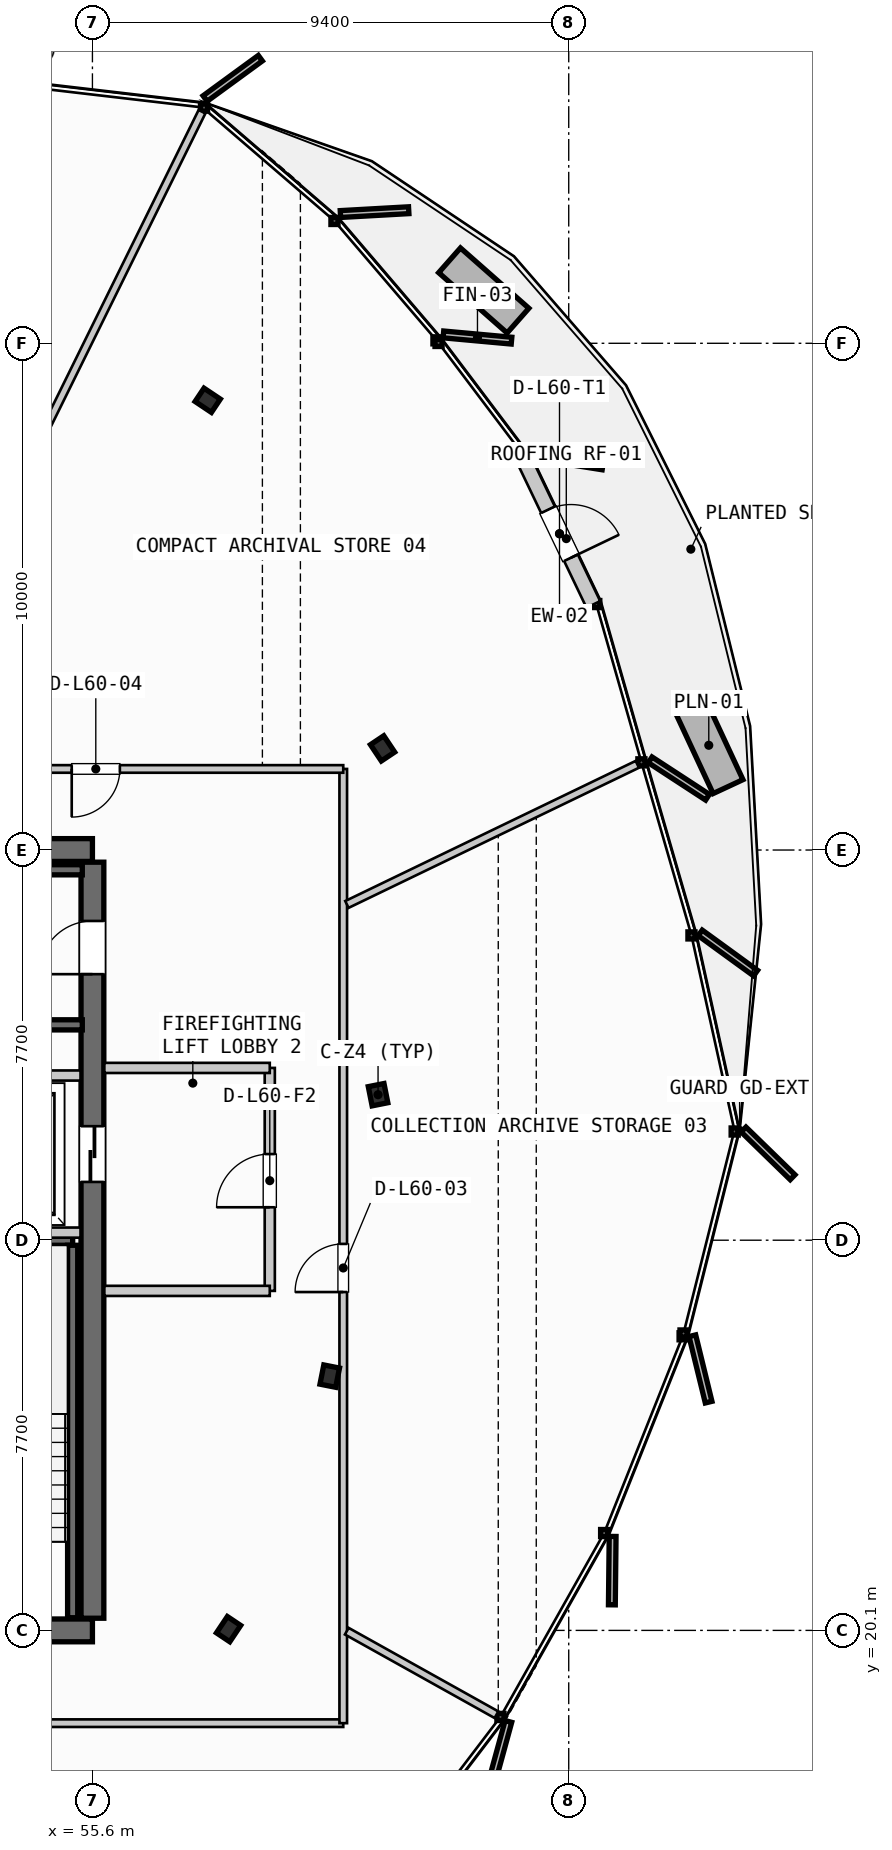
"""IFC4 building model, lengths in metres.
Left out: names, types, materials, properties, quantities, classifications, styles, units other than length and angle.
Written with IfcOpenShell. Run it as: python <this file> out.ifc"""

import sys

from ifc_helpers import new_model, si_unit, direction, frame, frame_2d, origin, origin_2d, place, context, subcontext, project, spatial, rectangle, i_section, extrude, source, transform, mapped, element, fill, save


model = new_model("IFC4")
c1 = context("Model", 3, precision=1e-05, world=origin(), true_north=direction((0.0, 1.0)))
c2 = subcontext(c1, "Body", "Model", "MODEL_VIEW")
j1 = project(units=[si_unit("LENGTHUNIT", "METRE"), si_unit("PLANEANGLEUNIT", "RADIAN")], contexts=[c1])
p1 = place(None, origin())
s1 = spatial("IfcSite", under=j1, at=p1, CompositionType="ELEMENT")
p2 = place(p1, origin())
s2 = spatial("IfcBuilding", under=s1, at=p2, CompositionType="ELEMENT")
p3 = place(p2, frame((0.0, 0.0, 231.85)))
s3 = spatial("IfcBuildingStorey", under=s2, at=p3, CompositionType="ELEMENT", Elevation=231.85)
p4 = place(p3, frame((38.0, 20.1, 0.0), z_axis=(0.0, 0.0, 1.0), x_axis=(1.0, 0.0, 0.0)))
e1 = element("IfcWall", 1, at=p4, inside=s3, PredefinedType="SHEAR", context=c2, shape_type="SweptSolid", body=[
    extrude(rectangle(XDim=17.6, YDim=0.45, at=frame_2d((8.8, 0.0))), origin(), (0.0, 0.0, 1.0), 3.21),
])
p5 = place(p4, frame((1.4, 0.0, 0.0)))
e2 = element("IfcOpeningElement", 2, at=p5, cuts=e1, PredefinedType="OPENING", context=c2, shape_type="SweptSolid", body=[
    extrude(rectangle(XDim=1.05, YDim=2.15, at=frame_2d((0.525, 1.075))), frame((0.0, 0.235, 0.0), z_axis=(0.0, -1.0, 0.0), x_axis=(1.0, 0.0, 0.0)), (0.0, 0.0, 1.0), 0.47),
])
p6 = place(p4, frame((15.15, 0.0, 0.0)))
e3 = element("IfcOpeningElement", 3, at=p6, cuts=e1, PredefinedType="OPENING", context=c2, shape_type="SweptSolid", body=[
    extrude(rectangle(XDim=1.05, YDim=2.15, at=frame_2d((0.525, 1.075))), frame((0.0, 0.235, 0.0), z_axis=(0.0, -1.0, 0.0), x_axis=(1.0, 0.0, 0.0)), (0.0, 0.0, 1.0), 0.47),
])
p7 = place(p4, frame((5.25, 0.0, 0.0)))
e4 = element("IfcOpeningElement", 4, at=p7, cuts=e1, PredefinedType="OPENING", context=c2, shape_type="SweptSolid", body=[
    extrude(rectangle(XDim=0.95, YDim=2.15, at=frame_2d((0.475, 1.075))), frame((0.0, 0.235, 0.0), z_axis=(0.0, -1.0, 0.0), x_axis=(1.0, 0.0, 0.0)), (0.0, 0.0, 1.0), 0.47),
])
p8 = place(p4, frame((11.4, 0.0, 0.0)))
e5 = element("IfcOpeningElement", 5, at=p8, cuts=e1, PredefinedType="OPENING", context=c2, shape_type="SweptSolid", body=[
    extrude(rectangle(XDim=0.95, YDim=2.15, at=frame_2d((0.475, 1.075))), frame((0.0, 0.235, 0.0), z_axis=(0.0, -1.0, 0.0), x_axis=(1.0, 0.0, 0.0)), (0.0, 0.0, 1.0), 0.47),
])
p9 = place(p3, frame((55.6, 35.5, 0.0), z_axis=(0.0, 0.0, 1.0), x_axis=(-1.0, 0.0, 0.0)))
e6 = element("IfcWall", 6, at=p9, inside=s3, PredefinedType="SHEAR", context=c2, shape_type="SweptSolid", body=[
    extrude(rectangle(XDim=17.6, YDim=0.45, at=frame_2d((8.8, 0.0))), origin(), (0.0, 0.0, 1.0), 3.21),
])
p10 = place(p9, frame((8.05, 0.0, 0.0)))
e7 = element("IfcOpeningElement", 7, at=p10, cuts=e6, PredefinedType="OPENING", context=c2, shape_type="SweptSolid", body=[
    extrude(rectangle(XDim=1.5, YDim=2.2, at=frame_2d((0.75, 1.1))), frame((0.0, 0.235, 0.0), z_axis=(0.0, -1.0, 0.0), x_axis=(1.0, 0.0, 0.0)), (0.0, 0.0, 1.0), 0.47),
])
p11 = place(p9, frame((15.85, 0.0, 0.0)))
e8 = element("IfcOpeningElement", 8, at=p11, cuts=e6, PredefinedType="OPENING", context=c2, shape_type="SweptSolid", body=[
    extrude(rectangle(XDim=0.85, YDim=2.15, at=frame_2d((0.425, 1.075))), frame((0.0, 0.235, 0.0), z_axis=(0.0, -1.0, 0.0), x_axis=(1.0, 0.0, 0.0)), (0.0, 0.0, 1.0), 0.47),
])
p12 = place(p9, frame((14.35, 0.0, 0.0)))
e9 = element("IfcOpeningElement", 9, at=p12, cuts=e6, PredefinedType="OPENING", context=c2, shape_type="SweptSolid", body=[
    extrude(rectangle(XDim=0.85, YDim=2.15, at=frame_2d((0.425, 1.075))), frame((0.0, 0.235, 0.0), z_axis=(0.0, -1.0, 0.0), x_axis=(1.0, 0.0, 0.0)), (0.0, 0.0, 1.0), 0.47),
])
p13 = place(p9, frame((12.3, 0.0, 0.0)))
e10 = element("IfcOpeningElement", 10, at=p13, cuts=e6, PredefinedType="OPENING", context=c2, shape_type="SweptSolid", body=[
    extrude(rectangle(XDim=0.95, YDim=2.15, at=frame_2d((0.475, 1.075))), frame((0.0, 0.235, 0.0), z_axis=(0.0, -1.0, 0.0), x_axis=(1.0, 0.0, 0.0)), (0.0, 0.0, 1.0), 0.47),
])
p14 = place(p9, frame((10.2, 0.0, 0.0)))
e11 = element("IfcOpeningElement", 11, at=p14, cuts=e6, PredefinedType="OPENING", context=c2, shape_type="SweptSolid", body=[
    extrude(rectangle(XDim=0.9, YDim=2.15, at=frame_2d((0.45, 1.075))), frame((0.0, 0.235, 0.0), z_axis=(0.0, -1.0, 0.0), x_axis=(1.0, 0.0, 0.0)), (0.0, 0.0, 1.0), 0.47),
])
p15 = place(p3, frame((55.6, 20.34, 0.0), z_axis=(0.0, 0.0, 1.0), x_axis=(0.0, 1.0, 0.0)))
e12 = element("IfcWall", 12, at=p15, inside=s3, PredefinedType="SHEAR", context=c2, shape_type="SweptSolid", body=[
    extrude(rectangle(XDim=14.92, YDim=0.45, at=frame_2d((7.46, 0.0))), origin(), (0.0, 0.0, 1.0), 3.21),
])
p16 = place(p15, frame((12.71, 0.0, 0.0)))
e13 = element("IfcOpeningElement", 13, at=p16, cuts=e12, PredefinedType="OPENING", context=c2, shape_type="SweptSolid", body=[
    extrude(rectangle(XDim=1.05, YDim=2.15, at=frame_2d((0.525, 1.075))), frame((0.0, 0.235, 0.0), z_axis=(0.0, -1.0, 0.0), x_axis=(1.0, 0.0, 0.0)), (0.0, 0.0, 1.0), 0.47),
])
p17 = place(p15, frame((8.61, 0.0, 0.0)))
e14 = element("IfcOpeningElement", 14, at=p17, cuts=e12, PredefinedType="OPENING", context=c2, shape_type="SweptSolid", body=[
    extrude(rectangle(XDim=1.1, YDim=2.2, at=frame_2d((0.55, 1.1))), frame((0.0, 0.235, 0.0), z_axis=(0.0, -1.0, 0.0), x_axis=(1.0, 0.0, 0.0)), (0.0, 0.0, 1.0), 0.47),
])
m1 = source(origin(), c2, "Body", "SweptSolid", [
    extrude(i_section(OverallWidth=0.387, OverallDepth=0.316, WebThickness=0.019, FlangeThickness=0.028, FilletRadius=0.015, at=origin_2d()), origin(), (0.0, 0.0, 1.0), 3.21),
])
for number, where, z_axis, x_axis in (
    (15, (61.237, 30.672, 0.0), (0.0, 0.0, 1.0), (0.981, 0.195, 0.0)),
    (16, (61.326, 37.506, 0.0), (0.0, 0.0, 1.0), (0.831, 0.556, 0.0)),
    (17, (57.875, 44.375, 0.0), (0.0, 0.0, 1.0), (0.556, 0.831, 0.0)),
    (18, (58.287, 20.125, 0.0), (0.0, 0.0, 1.0), (0.831, -0.556, 0.0)),
    (19, (60.284, 25.118, 0.0), (0.0, 0.0, 1.0), (0.981, -0.195, 0.0)),
):
    element("IfcColumn", number, at=place(p3, frame(where, z_axis=z_axis, x_axis=x_axis)), inside=s3, PredefinedType="COLUMN", context=c2, shape_type="MappedRepresentation", body=[
        mapped(m1, transform((0.0, 0.0, 0.0), scale=1.0)),
    ])
p18 = place(p3, frame((64.15, 43.136, 0.0), z_axis=(0.0, 0.0, 1.0), x_axis=(0.431829849954, -0.901955087955, 0.0)))
e20 = element("IfcWall", 20, at=p18, inside=s3, PredefinedType="SOLIDWALL", context=c2, shape_type="SweptSolid", body=[
    extrude(rectangle(XDim=3.092, YDim=0.3, at=frame_2d((1.546, 0.0))), origin(), (0.0, 0.0, 1.0), 2.735),
])
p19 = place(p18, frame((1.021, 0.0, 0.0)))
e21 = element("IfcOpeningElement", 21, at=p19, cuts=e20, PredefinedType="OPENING", context=c2, shape_type="SweptSolid", body=[
    extrude(rectangle(XDim=1.05, YDim=2.2, at=frame_2d((0.525, 1.1))), frame((0.0, 0.16, 0.0), z_axis=(0.0, -1.0, 0.0), x_axis=(1.0, 0.0, 0.0)), (0.0, 0.0, 1.0), 0.32),
])
p20 = place(p3, frame((52.15, 27.8, 0.0), z_axis=(0.0, 0.0, 1.0), x_axis=(1.0, 0.0, 0.0)))
e22 = element("IfcWall", 22, at=p20, inside=s3, PredefinedType="SHEAR", context=c2, shape_type="SweptSolid", body=[
    extrude(rectangle(XDim=3.06, YDim=0.2, at=frame_2d((1.53, 0.0))), origin(), (0.0, 0.0, 1.0), 3.21),
])
for number, where, z_axis, x_axis in (
    (23, (55.21, 27.7, 0.0), (0.0, 0.0, 1.0), (0.0, -1.0, 0.0)),
    (24, (48.05, 35.11, 0.0), (0.0, 0.0, 1.0), (1.0, 0.0, 0.0)),
    (25, (55.4, 32.05, 0.0), (0.0, 0.0, 1.0), (-1.0, 0.0, 0.0)),
):
    element("IfcWall", number, at=place(p3, frame(where, z_axis=z_axis, x_axis=x_axis)), inside=s3, PredefinedType="SHEAR", context=c2, shape_type="SweptSolid", body=[
        extrude(rectangle(XDim=7.35, YDim=0.2, at=frame_2d((3.675, 0.0))), origin(), (0.0, 0.0, 1.0), 3.21),
    ])
for number, where, z_axis, x_axis in (
    (26, (52.45, 27.95, 0.0), (0.0, 0.0, 1.0), (1.0, 0.0, 0.0)),
    (27, (52.45, 31.05, 0.0), (0.0, 0.0, 1.0), (1.0, 0.0, 0.0)),
):
    element("IfcWall", number, at=place(p3, frame(where, z_axis=z_axis, x_axis=x_axis)), inside=s3, PredefinedType="PARTITIONING", context=c2, shape_type="SweptSolid", body=[
        extrude(rectangle(XDim=2.915, YDim=0.2, at=frame_2d((1.458, 0.0))), origin(), (0.0, 0.0, 1.0), 2.28),
    ])
p21 = place(p3, frame((59.1, 26.8, 0.0), z_axis=(0.0, 0.0, 1.0), x_axis=(0.0, 1.0, 0.0)))
e28 = element("IfcWall", 28, at=p21, inside=s3, PredefinedType="PARTITIONING", context=c2, shape_type="SweptSolid", body=[
    extrude(rectangle(XDim=4.4, YDim=0.2, at=frame_2d((2.2, 0.0))), origin(), (0.0, 0.0, 1.0), 2.28),
])
p22 = place(p21, frame((1.65, 0.0, 0.0)))
e29 = element("IfcOpeningElement", 29, at=p22, cuts=e28, PredefinedType="OPENING", context=c2, shape_type="SweptSolid", body=[
    extrude(rectangle(XDim=1.05, YDim=2.15, at=frame_2d((0.525, 1.075))), frame((0.0, 0.11, 0.0), z_axis=(0.0, -1.0, 0.0), x_axis=(1.0, 0.0, 0.0)), (0.0, 0.0, 1.0), 0.22),
])
for number, where, z_axis, x_axis in (
    (30, (55.835, 26.8, 0.0), (0.0, 0.0, 1.0), (1.0, 0.0, 0.0)),
    (31, (55.835, 31.2, 0.0), (0.0, 0.0, 1.0), (1.0, 0.0, 0.0)),
):
    element("IfcWall", number, at=place(p3, frame(where, z_axis=z_axis, x_axis=x_axis)), inside=s3, PredefinedType="PARTITIONING", context=c2, shape_type="SweptSolid", body=[
        extrude(rectangle(XDim=3.265, YDim=0.2, at=frame_2d((1.633, 0.0))), origin(), (0.0, 0.0, 1.0), 2.28),
    ])
p23 = place(p3, frame((31.68, 18.269, 0.0), z_axis=(0.0, 0.0, 1.0), x_axis=(1.0, 0.0, 0.0)))
e32 = element("IfcWall", 32, at=p23, inside=s3, PredefinedType="PARTITIONING", context=c2, shape_type="SweptSolid", body=[
    extrude(rectangle(XDim=28.87, YDim=0.15, at=frame_2d((14.435, 0.0))), origin(), (0.0, 0.0, 1.0), 2.28),
])
p24 = place(p23, frame((7.591, 0.0, 0.0)))
e33 = element("IfcOpeningElement", 33, at=p24, cuts=e32, PredefinedType="OPENING", context=c2, shape_type="SweptSolid", body=[
    extrude(rectangle(XDim=0.95, YDim=2.15, at=frame_2d((0.475, 1.075))), frame((0.0, 0.085, 0.0), z_axis=(0.0, -1.0, 0.0), x_axis=(1.0, 0.0, 0.0)), (0.0, 0.0, 1.0), 0.17),
])
p25 = place(p23, frame((19.851, 0.0, 0.0)))
e34 = element("IfcOpeningElement", 34, at=p25, cuts=e32, PredefinedType="OPENING", context=c2, shape_type="SweptSolid", body=[
    extrude(rectangle(XDim=0.95, YDim=2.15, at=frame_2d((0.475, 1.075))), frame((0.0, 0.085, 0.0), z_axis=(0.0, -1.0, 0.0), x_axis=(1.0, 0.0, 0.0)), (0.0, 0.0, 1.0), 0.17),
])
p26 = place(p3, frame((60.55, 18.269, 0.0), z_axis=(0.0, 0.0, 1.0), x_axis=(0.0, 1.0, 0.0)))
e35 = element("IfcWall", 35, at=p26, inside=s3, PredefinedType="PARTITIONING", context=c2, shape_type="SweptSolid", body=[
    extrude(rectangle(XDim=18.831, YDim=0.15, at=frame_2d((9.416, 0.0))), origin(), (0.0, 0.0, 1.0), 2.28),
])
p27 = place(p26, frame((8.508, 0.0, 0.0)))
e36 = element("IfcOpeningElement", 36, at=p27, cuts=e35, PredefinedType="OPENING", context=c2, shape_type="SweptSolid", body=[
    extrude(rectangle(XDim=0.95, YDim=2.15, at=frame_2d((0.475, 1.075))), frame((0.0, 0.085, 0.0), z_axis=(0.0, -1.0, 0.0), x_axis=(1.0, 0.0, 0.0)), (0.0, 0.0, 1.0), 0.17),
])
p28 = place(p3, frame((60.55, 37.1, 0.0), z_axis=(0.0, 0.0, 1.0), x_axis=(-1.0, 0.0, 0.0)))
e37 = element("IfcWall", 37, at=p28, inside=s3, PredefinedType="PARTITIONING", context=c2, shape_type="SweptSolid", body=[
    extrude(rectangle(XDim=28.87, YDim=0.15, at=frame_2d((14.435, 0.0))), origin(), (0.0, 0.0, 1.0), 2.28),
])
p29 = place(p28, frame((4.409, 0.0, 0.0)))
e38 = element("IfcOpeningElement", 38, at=p29, cuts=e37, PredefinedType="OPENING", context=c2, shape_type="SweptSolid", body=[
    extrude(rectangle(XDim=0.95, YDim=2.15, at=frame_2d((0.475, 1.075))), frame((0.0, 0.085, 0.0), z_axis=(0.0, -1.0, 0.0), x_axis=(1.0, 0.0, 0.0)), (0.0, 0.0, 1.0), 0.17),
])
p30 = place(p28, frame((13.084, 0.0, 0.0)))
e39 = element("IfcOpeningElement", 39, at=p30, cuts=e37, PredefinedType="OPENING", context=c2, shape_type="SweptSolid", body=[
    extrude(rectangle(XDim=0.95, YDim=2.15, at=frame_2d((0.475, 1.075))), frame((0.0, 0.085, 0.0), z_axis=(0.0, -1.0, 0.0), x_axis=(1.0, 0.0, 0.0)), (0.0, 0.0, 1.0), 0.17),
])
p31 = place(p28, frame((22.637, 0.0, 0.0)))
e40 = element("IfcOpeningElement", 40, at=p31, cuts=e37, PredefinedType="OPENING", context=c2, shape_type="SweptSolid", body=[
    extrude(rectangle(XDim=0.95, YDim=2.15, at=frame_2d((0.475, 1.075))), frame((0.0, 0.085, 0.0), z_axis=(0.0, -1.0, 0.0), x_axis=(1.0, 0.0, 0.0)), (0.0, 0.0, 1.0), 0.17),
])
p32 = place(p3, frame((60.62, 20.084, 0.0), z_axis=(0.0, 0.0, 1.0), x_axis=(0.873229838151, -0.487308577559, 0.0)))
e41 = element("IfcWall", 41, at=p32, inside=s3, PredefinedType="PARTITIONING", context=c2, shape_type="SweptSolid", body=[
    extrude(rectangle(XDim=3.383, YDim=0.15, at=frame_2d((1.692, 0.0))), origin(), (0.0, 0.0, 1.0), 2.28),
])
p33 = place(p3, frame((60.622, 34.426, 0.0), z_axis=(0.0, 0.0, 1.0), x_axis=(0.900645362469, 0.434554865424, 0.0)))
e42 = element("IfcWall", 42, at=p33, inside=s3, PredefinedType="PARTITIONING", context=c2, shape_type="SweptSolid", body=[
    extrude(rectangle(XDim=6.364, YDim=0.15, at=frame_2d((3.182, 0.0))), origin(), (0.0, 0.0, 1.0), 2.28),
])
p34 = place(p3, frame((51.398, 37.172, 0.0), z_axis=(0.0, 0.0, 1.0), x_axis=(0.442495584372, 0.896770682957, 0.0)))
e43 = element("IfcWall", 43, at=p34, inside=s3, PredefinedType="PARTITIONING", context=c2, shape_type="SweptSolid", body=[
    extrude(rectangle(XDim=14.384, YDim=0.15, at=frame_2d((7.192, 0.0))), origin(), (0.0, 0.0, 1.0), 2.28),
])
m2 = source(origin(), c2, "Body", "SweptSolid", [
    extrude(rectangle(XDim=1.05, YDim=2.2, at=frame_2d((0.525, 1.1))), frame((0.0, 0.025, 0.0), z_axis=(0.0, -1.0, 0.0), x_axis=(1.0, 0.0, 0.0)), (0.0, 0.0, 1.0), 0.05),
])
p35 = place(p19, origin())
e44 = element("IfcDoor", 44, at=p35, inside=s3, OperationType="SINGLE_SWING_RIGHT", PredefinedType="DOOR", context=c2, shape_type="MappedRepresentation", body=[
    mapped(m2, transform((0.0, 0.0, 0.0), scale=1.0)),
])
fill(e21, e44)
m3 = source(origin(), c2, "Body", "SweptSolid", [
    extrude(rectangle(XDim=1.05, YDim=2.15, at=frame_2d((0.525, 1.075))), frame((0.0, 0.025, 0.0), z_axis=(0.0, -1.0, 0.0), x_axis=(1.0, 0.0, 0.0)), (0.0, 0.0, 1.0), 0.05),
])
p36 = place(p16, origin())
e45 = element("IfcDoor", 45, at=p36, inside=s3, OperationType="SINGLE_SWING_LEFT", PredefinedType="DOOR", context=c2, shape_type="MappedRepresentation", body=[
    mapped(m3, transform((0.0, 0.0, 0.0), scale=1.0)),
])
fill(e13, e45)
m4 = source(origin(), c2, "Body", "SweptSolid", [
    extrude(rectangle(XDim=1.1, YDim=2.2, at=frame_2d((0.55, 1.1))), frame((0.0, 0.025, 0.0), z_axis=(0.0, -1.0, 0.0), x_axis=(1.0, 0.0, 0.0)), (0.0, 0.0, 1.0), 0.05),
])
p37 = place(p17, origin())
e46 = element("IfcDoor", 46, at=p37, inside=s3, OperationType="SLIDING_TO_RIGHT", PredefinedType="DOOR", context=c2, shape_type="MappedRepresentation", body=[
    mapped(m4, transform((0.0, 0.0, 0.0), scale=1.0)),
])
fill(e14, e46)
p38 = place(p22, origin())
e47 = element("IfcDoor", 47, at=p38, inside=s3, OperationType="SINGLE_SWING_LEFT", PredefinedType="DOOR", context=c2, shape_type="MappedRepresentation", body=[
    mapped(m3, transform((0.0, 0.0, 0.0), scale=1.0)),
])
fill(e29, e47)
m5 = source(origin(), c2, "Body", "SweptSolid", [
    extrude(rectangle(XDim=0.95, YDim=2.15, at=frame_2d((0.475, 1.075))), frame((0.0, 0.025, 0.0), z_axis=(0.0, -1.0, 0.0), x_axis=(1.0, 0.0, 0.0)), (0.0, 0.0, 1.0), 0.05),
])
p39 = place(p27, origin())
e48 = element("IfcDoor", 48, at=p39, inside=s3, OperationType="SINGLE_SWING_LEFT", PredefinedType="DOOR", context=c2, shape_type="MappedRepresentation", body=[
    mapped(m5, transform((0.0, 0.0, 0.0), scale=1.0)),
])
fill(e36, e48)
p40 = place(p29, origin())
e49 = element("IfcDoor", 49, at=p40, inside=s3, OperationType="SINGLE_SWING_RIGHT", PredefinedType="DOOR", context=c2, shape_type="MappedRepresentation", body=[
    mapped(m5, transform((0.0, 0.0, 0.0), scale=1.0)),
])
fill(e38, e49)
save(model, sys.argv[1])
